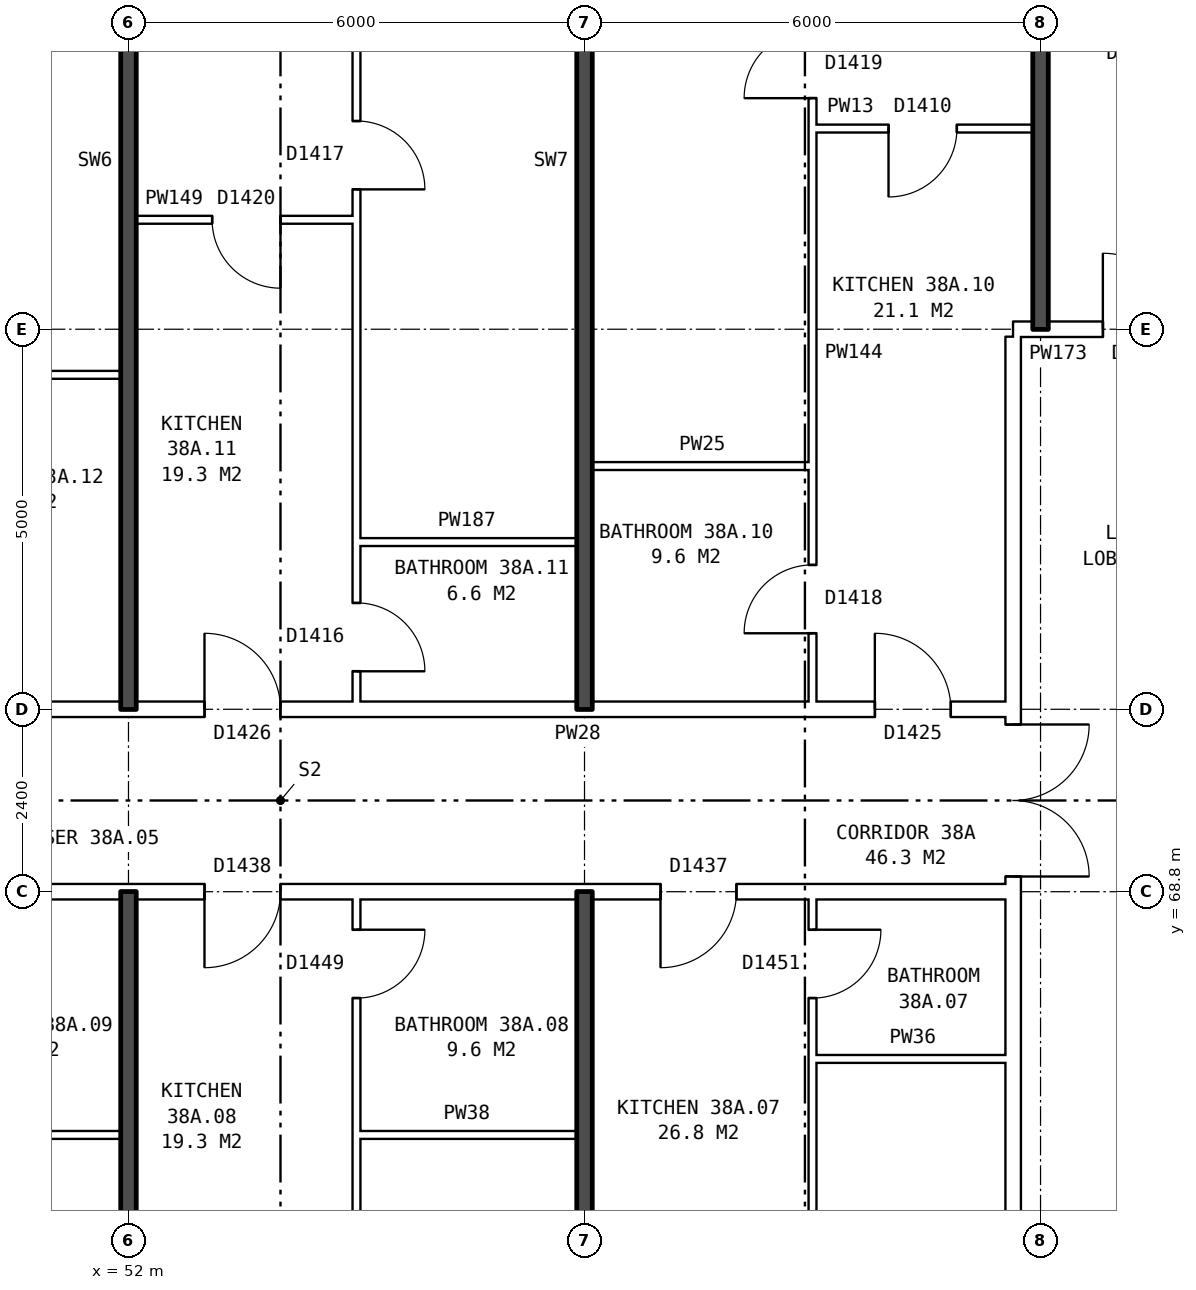
"""IFC4 building model, lengths in metres.
Left out: names, types, materials, properties, quantities, classifications, styles, units other than length and angle.
Written with IfcOpenShell. Run it as: python <this file> out.ifc"""

import sys

from ifc_helpers import new_model, si_unit, direction, frame, frame_2d, origin, place, context, subcontext, project, spatial, rectangle, extrude, element, fill, save


model = new_model("IFC4")
c1 = context("Model", 3, precision=1e-05, world=origin(), true_north=direction((0.0, 1.0)))
c2 = subcontext(c1, "Body", "Model", "MODEL_VIEW")
j1 = project(units=[si_unit("LENGTHUNIT", "METRE"), si_unit("PLANEANGLEUNIT", "RADIAN")], contexts=[c1])
p1 = place(None, origin())
s1 = spatial("IfcSite", under=j1, at=p1, CompositionType="ELEMENT")
p2 = place(p1, origin())
s2 = spatial("IfcBuilding", under=s1, at=p2, CompositionType="ELEMENT")
p3 = place(p2, frame((0.0, 0.0, 136.1)))
s3 = spatial("IfcBuildingStorey", under=s2, at=p3, CompositionType="ELEMENT", Elevation=136.1)
p4 = place(p3, frame((63.64, 63.9, 0.0), z_axis=(0.0, 0.0, 1.0), x_axis=(0.0, 1.0, 0.0)))
e1 = element("IfcWall", 1, at=p4, inside=s3, PredefinedType="PARTITIONING", context=c2, shape_type="SweptSolid", body=[
    extrude(rectangle(XDim=12.2, YDim=0.2, at=frame_2d((6.1, 0.0))), origin(), (0.0, 0.0, 1.0), 2.85),
])
p5 = place(p4, frame((5.1, 0.0, 0.0)))
e2 = element("IfcOpeningElement", 2, at=p5, cuts=e1, PredefinedType="OPENING", context=c2, shape_type="SweptSolid", body=[
    extrude(rectangle(XDim=2.0, YDim=2.1, at=frame_2d((1.0, 1.05))), frame((0.0, 0.11, 0.0), z_axis=(0.0, -1.0, 0.0), x_axis=(1.0, 0.0, 0.0)), (0.0, 0.0, 1.0), 0.22),
])
for number, where, z_axis, x_axis in (
    (3, (49.0, 65.6, 0.0), (0.0, 0.0, 1.0), (1.0, 0.0, 0.0)),
    (4, (55.0, 65.6, 0.0), (0.0, 0.0, 1.0), (1.0, 0.0, 0.0)),
):
    element("IfcWall", number, at=place(p3, frame(where, z_axis=z_axis, x_axis=x_axis)), inside=s3, PredefinedType="PARTITIONING", context=c2, shape_type="SweptSolid", body=[
        extrude(rectangle(XDim=2.9, YDim=0.1, at=frame_2d((1.45, 0.0))), origin(), (0.0, 0.0, 1.0), 2.85),
    ])
p6 = place(p3, frame((61.0, 66.6, 0.0), z_axis=(0.0, 0.0, 1.0), x_axis=(1.0, 0.0, 0.0)))
e5 = element("IfcWall", 5, at=p6, inside=s3, PredefinedType="PARTITIONING", context=c2, shape_type="SweptSolid", body=[
    extrude(rectangle(XDim=2.64, YDim=0.1, at=frame_2d((1.32, 0.0))), origin(), (0.0, 0.0, 1.0), 2.85),
])
p7 = place(p3, frame((44.36, 68.8, 0.0), z_axis=(0.0, 0.0, 1.0), x_axis=(1.0, 0.0, 0.0)))
e6 = element("IfcWall", 6, at=p7, inside=s3, PredefinedType="PARTITIONING", context=c2, shape_type="SweptSolid", body=[
    extrude(rectangle(XDim=19.28, YDim=0.2, at=frame_2d((9.64, 0.0))), origin(), (0.0, 0.0, 1.0), 2.85),
])
p8 = place(p7, frame((14.64, 0.0, 0.0)))
e7 = element("IfcOpeningElement", 7, at=p8, cuts=e6, PredefinedType="OPENING", context=c2, shape_type="SweptSolid", body=[
    extrude(rectangle(XDim=1.0, YDim=2.1, at=frame_2d((0.5, 1.05))), frame((0.0, 0.11, 0.0), z_axis=(0.0, -1.0, 0.0), x_axis=(1.0, 0.0, 0.0)), (0.0, 0.0, 1.0), 0.22),
])
p9 = place(p7, frame((8.64, 0.0, 0.0)))
e8 = element("IfcOpeningElement", 8, at=p9, cuts=e6, PredefinedType="OPENING", context=c2, shape_type="SweptSolid", body=[
    extrude(rectangle(XDim=1.0, YDim=2.1, at=frame_2d((0.5, 1.05))), frame((0.0, 0.11, 0.0), z_axis=(0.0, -1.0, 0.0), x_axis=(1.0, 0.0, 0.0)), (0.0, 0.0, 1.0), 0.22),
])
p10 = place(p7, frame((2.64, 0.0, 0.0)))
e9 = element("IfcOpeningElement", 9, at=p10, cuts=e6, PredefinedType="OPENING", context=c2, shape_type="SweptSolid", body=[
    extrude(rectangle(XDim=1.0, YDim=2.1, at=frame_2d((0.5, 1.05))), frame((0.0, 0.11, 0.0), z_axis=(0.0, -1.0, 0.0), x_axis=(1.0, 0.0, 0.0)), (0.0, 0.0, 1.0), 0.22),
])
p11 = place(p3, frame((44.36, 71.2, 0.0), z_axis=(0.0, 0.0, 1.0), x_axis=(1.0, 0.0, 0.0)))
e10 = element("IfcWall", 10, at=p11, inside=s3, PredefinedType="PARTITIONING", context=c2, shape_type="SweptSolid", body=[
    extrude(rectangle(XDim=19.28, YDim=0.2, at=frame_2d((9.64, 0.0))), origin(), (0.0, 0.0, 1.0), 2.85),
])
p12 = place(p11, frame((17.46, 0.0, 0.0)))
e11 = element("IfcOpeningElement", 11, at=p12, cuts=e10, PredefinedType="OPENING", context=c2, shape_type="SweptSolid", body=[
    extrude(rectangle(XDim=1.0, YDim=2.1, at=frame_2d((0.5, 1.05))), frame((0.0, 0.11, 0.0), z_axis=(0.0, -1.0, 0.0), x_axis=(1.0, 0.0, 0.0)), (0.0, 0.0, 1.0), 0.22),
])
p13 = place(p11, frame((8.64, 0.0, 0.0)))
e12 = element("IfcOpeningElement", 12, at=p13, cuts=e10, PredefinedType="OPENING", context=c2, shape_type="SweptSolid", body=[
    extrude(rectangle(XDim=1.0, YDim=2.1, at=frame_2d((0.5, 1.05))), frame((0.0, 0.11, 0.0), z_axis=(0.0, -1.0, 0.0), x_axis=(1.0, 0.0, 0.0)), (0.0, 0.0, 1.0), 0.22),
])
p14 = place(p11, frame((2.64, 0.0, 0.0)))
e13 = element("IfcOpeningElement", 13, at=p14, cuts=e10, PredefinedType="OPENING", context=c2, shape_type="SweptSolid", body=[
    extrude(rectangle(XDim=1.0, YDim=2.1, at=frame_2d((0.5, 1.05))), frame((0.0, 0.11, 0.0), z_axis=(0.0, -1.0, 0.0), x_axis=(1.0, 0.0, 0.0)), (0.0, 0.0, 1.0), 0.22),
])
for number, where, z_axis, x_axis in (
    (14, (55.0, 73.4, 0.0), (0.0, 0.0, 1.0), (1.0, 0.0, 0.0)),
    (15, (58.1, 74.4, 0.0), (0.0, 0.0, 1.0), (1.0, 0.0, 0.0)),
    (16, (49.0, 75.6, 0.0), (0.0, 0.0, 1.0), (1.0, 0.0, 0.0)),
):
    element("IfcWall", number, at=place(p3, frame(where, z_axis=z_axis, x_axis=x_axis)), inside=s3, PredefinedType="PARTITIONING", context=c2, shape_type="SweptSolid", body=[
        extrude(rectangle(XDim=2.9, YDim=0.1, at=frame_2d((1.45, 0.0))), origin(), (0.0, 0.0, 1.0), 2.85),
    ])
p15 = place(p3, frame((63.64, 76.2, 0.0), z_axis=(0.0, 0.0, 1.0), x_axis=(1.0, 0.0, 0.0)))
e17 = element("IfcWall", 17, at=p15, inside=s3, PredefinedType="PARTITIONING", context=c2, shape_type="SweptSolid", body=[
    extrude(rectangle(XDim=3.0, YDim=0.2, at=frame_2d((1.5, 0.0))), origin(), (0.0, 0.0, 1.0), 2.85),
])
p16 = place(p15, frame((1.18, 0.0, 0.0)))
e18 = element("IfcOpeningElement", 18, at=p16, cuts=e17, PredefinedType="OPENING", context=c2, shape_type="SweptSolid", body=[
    extrude(rectangle(XDim=1.0, YDim=2.1, at=frame_2d((0.5, 1.05))), frame((0.0, 0.11, 0.0), z_axis=(0.0, -1.0, 0.0), x_axis=(1.0, 0.0, 0.0)), (0.0, 0.0, 1.0), 0.22),
])
p17 = place(p3, frame((52.1, 77.64, 0.0), z_axis=(0.0, 0.0, 1.0), x_axis=(1.0, 0.0, 0.0)))
e19 = element("IfcWall", 19, at=p17, inside=s3, PredefinedType="PARTITIONING", context=c2, shape_type="SweptSolid", body=[
    extrude(rectangle(XDim=2.9, YDim=0.1, at=frame_2d((1.45, 0.0))), origin(), (0.0, 0.0, 1.0), 2.85),
])
p18 = place(p17, frame((1.0, 0.0, 0.0)))
e20 = element("IfcOpeningElement", 20, at=p18, cuts=e19, PredefinedType="OPENING", context=c2, shape_type="SweptSolid", body=[
    extrude(rectangle(XDim=0.9, YDim=2.1, at=frame_2d((0.45, 1.05))), frame((0.0, 0.06, 0.0), z_axis=(0.0, -1.0, 0.0), x_axis=(1.0, 0.0, 0.0)), (0.0, 0.0, 1.0), 0.12),
])
p19 = place(p3, frame((61.0, 78.84, 0.0), z_axis=(0.0, 0.0, 1.0), x_axis=(1.0, 0.0, 0.0)))
e21 = element("IfcWall", 21, at=p19, inside=s3, PredefinedType="PARTITIONING", context=c2, shape_type="SweptSolid", body=[
    extrude(rectangle(XDim=2.9, YDim=0.1, at=frame_2d((1.45, 0.0))), origin(), (0.0, 0.0, 1.0), 2.85),
])
p20 = place(p19, frame((1.0, 0.0, 0.0)))
e22 = element("IfcOpeningElement", 22, at=p20, cuts=e21, PredefinedType="OPENING", context=c2, shape_type="SweptSolid", body=[
    extrude(rectangle(XDim=0.9, YDim=2.1, at=frame_2d((0.45, 1.05))), frame((0.0, 0.06, 0.0), z_axis=(0.0, -1.0, 0.0), x_axis=(1.0, 0.0, 0.0)), (0.0, 0.0, 1.0), 0.12),
])
for number, where, z_axis, x_axis in (
    (23, (52.0, 54.36, 0.0), (0.0, 0.0, 1.0), (0.0, 1.0, 0.0)),
    (24, (52.0, 71.2, 0.0), (0.0, 0.0, 1.0), (0.0, 1.0, 0.0)),
):
    element("IfcWall", number, at=place(p3, frame(where, z_axis=z_axis, x_axis=x_axis)), inside=s3, PredefinedType="SOLIDWALL", context=c2, shape_type="SweptSolid", body=[
        extrude(rectangle(XDim=14.44, YDim=0.2, at=frame_2d((7.22, 0.0))), origin(), (0.0, 0.0, 1.0), 2.85),
    ])
p21 = place(p3, frame((55.0, 54.36, 0.0), z_axis=(0.0, 0.0, 1.0), x_axis=(0.0, 1.0, 0.0)))
e25 = element("IfcWall", 25, at=p21, inside=s3, PredefinedType="PARTITIONING", context=c2, shape_type="SweptSolid", body=[
    extrude(rectangle(XDim=14.34, YDim=0.1, at=frame_2d((7.17, 0.0))), origin(), (0.0, 0.0, 1.0), 2.85),
])
p22 = place(p21, frame((6.7, 0.0, 0.0)))
e26 = element("IfcOpeningElement", 26, at=p22, cuts=e25, PredefinedType="OPENING", context=c2, shape_type="SweptSolid", body=[
    extrude(rectangle(XDim=0.9, YDim=2.1, at=frame_2d((0.45, 1.05))), frame((0.0, 0.06, 0.0), z_axis=(0.0, -1.0, 0.0), x_axis=(1.0, 0.0, 0.0)), (0.0, 0.0, 1.0), 0.12),
])
p23 = place(p21, frame((13.04, 0.0, 0.0)))
e27 = element("IfcOpeningElement", 27, at=p23, cuts=e25, PredefinedType="OPENING", context=c2, shape_type="SweptSolid", body=[
    extrude(rectangle(XDim=0.9, YDim=2.1, at=frame_2d((0.45, 1.05))), frame((0.0, 0.06, 0.0), z_axis=(0.0, -1.0, 0.0), x_axis=(1.0, 0.0, 0.0)), (0.0, 0.0, 1.0), 0.12),
])
p24 = place(p3, frame((55.0, 71.3, 0.0), z_axis=(0.0, 0.0, 1.0), x_axis=(0.0, 1.0, 0.0)))
e28 = element("IfcWall", 28, at=p24, inside=s3, PredefinedType="PARTITIONING", context=c2, shape_type="SweptSolid", body=[
    extrude(rectangle(XDim=14.34, YDim=0.1, at=frame_2d((7.17, 0.0))), origin(), (0.0, 0.0, 1.0), 2.85),
])
p25 = place(p24, frame((6.74, 0.0, 0.0)))
e29 = element("IfcOpeningElement", 29, at=p25, cuts=e28, PredefinedType="OPENING", context=c2, shape_type="SweptSolid", body=[
    extrude(rectangle(XDim=0.9, YDim=2.1, at=frame_2d((0.45, 1.05))), frame((0.0, 0.06, 0.0), z_axis=(0.0, -1.0, 0.0), x_axis=(1.0, 0.0, 0.0)), (0.0, 0.0, 1.0), 0.12),
])
p26 = place(p24, frame((0.4, 0.0, 0.0)))
e30 = element("IfcOpeningElement", 30, at=p26, cuts=e28, PredefinedType="OPENING", context=c2, shape_type="SweptSolid", body=[
    extrude(rectangle(XDim=0.9, YDim=2.1, at=frame_2d((0.45, 1.05))), frame((0.0, 0.06, 0.0), z_axis=(0.0, -1.0, 0.0), x_axis=(1.0, 0.0, 0.0)), (0.0, 0.0, 1.0), 0.12),
])
for number, where, z_axis, x_axis in (
    (31, (58.0, 54.36, 0.0), (0.0, 0.0, 1.0), (0.0, 1.0, 0.0)),
    (32, (58.0, 71.2, 0.0), (0.0, 0.0, 1.0), (0.0, 1.0, 0.0)),
):
    element("IfcWall", number, at=place(p3, frame(where, z_axis=z_axis, x_axis=x_axis)), inside=s3, PredefinedType="SOLIDWALL", context=c2, shape_type="SweptSolid", body=[
        extrude(rectangle(XDim=14.44, YDim=0.2, at=frame_2d((7.22, 0.0))), origin(), (0.0, 0.0, 1.0), 2.85),
    ])
p27 = place(p3, frame((61.0, 54.36, 0.0), z_axis=(0.0, 0.0, 1.0), x_axis=(0.0, 1.0, 0.0)))
e33 = element("IfcWall", 33, at=p27, inside=s3, PredefinedType="PARTITIONING", context=c2, shape_type="SweptSolid", body=[
    extrude(rectangle(XDim=14.34, YDim=0.1, at=frame_2d((7.17, 0.0))), origin(), (0.0, 0.0, 1.0), 2.85),
])
p28 = place(p27, frame((4.2, 0.0, 0.0)))
e34 = element("IfcOpeningElement", 34, at=p28, cuts=e33, PredefinedType="OPENING", context=c2, shape_type="SweptSolid", body=[
    extrude(rectangle(XDim=0.9, YDim=2.1, at=frame_2d((0.45, 1.05))), frame((0.0, 0.06, 0.0), z_axis=(0.0, -1.0, 0.0), x_axis=(1.0, 0.0, 0.0)), (0.0, 0.0, 1.0), 0.12),
])
p29 = place(p27, frame((13.04, 0.0, 0.0)))
e35 = element("IfcOpeningElement", 35, at=p29, cuts=e33, PredefinedType="OPENING", context=c2, shape_type="SweptSolid", body=[
    extrude(rectangle(XDim=0.9, YDim=2.1, at=frame_2d((0.45, 1.05))), frame((0.0, 0.06, 0.0), z_axis=(0.0, -1.0, 0.0), x_axis=(1.0, 0.0, 0.0)), (0.0, 0.0, 1.0), 0.12),
])
p30 = place(p3, frame((61.0, 71.3, 0.0), z_axis=(0.0, 0.0, 1.0), x_axis=(0.0, 1.0, 0.0)))
e36 = element("IfcWall", 36, at=p30, inside=s3, PredefinedType="PARTITIONING", context=c2, shape_type="SweptSolid", body=[
    extrude(rectangle(XDim=14.34, YDim=0.1, at=frame_2d((7.17, 0.0))), origin(), (0.0, 0.0, 1.0), 2.85),
])
p31 = place(p30, frame((7.94, 0.0, 0.0)))
e37 = element("IfcOpeningElement", 37, at=p31, cuts=e36, PredefinedType="OPENING", context=c2, shape_type="SweptSolid", body=[
    extrude(rectangle(XDim=0.9, YDim=2.1, at=frame_2d((0.45, 1.05))), frame((0.0, 0.06, 0.0), z_axis=(0.0, -1.0, 0.0), x_axis=(1.0, 0.0, 0.0)), (0.0, 0.0, 1.0), 0.12),
])
p32 = place(p30, frame((0.9, 0.0, 0.0)))
e38 = element("IfcOpeningElement", 38, at=p32, cuts=e36, PredefinedType="OPENING", context=c2, shape_type="SweptSolid", body=[
    extrude(rectangle(XDim=0.9, YDim=2.1, at=frame_2d((0.45, 1.05))), frame((0.0, 0.06, 0.0), z_axis=(0.0, -1.0, 0.0), x_axis=(1.0, 0.0, 0.0)), (0.0, 0.0, 1.0), 0.12),
])
p33 = place(p3, frame((64.0, 76.2, 0.0), z_axis=(0.0, 0.0, 1.0), x_axis=(0.0, 1.0, 0.0)))
e39 = element("IfcWall", 39, at=p33, inside=s3, PredefinedType="SOLIDWALL", context=c2, shape_type="SweptSolid", body=[
    extrude(rectangle(XDim=9.44, YDim=0.2, at=frame_2d((4.72, 0.0))), origin(), (0.0, 0.0, 1.0), 2.85),
])
p34 = place(p5, frame((2.0, 0.0, 0.0), z_axis=(0.0, 0.0, 1.0), x_axis=(-1.0, 0.0, 0.0)))
e40 = element("IfcDoor", 40, at=p34, inside=s3, OperationType="DOUBLE_DOOR_SINGLE_SWING", PredefinedType="DOOR", context=c2, shape_type="SweptSolid", body=[
    extrude(rectangle(XDim=2.0, YDim=2.1, at=frame_2d((1.0, 1.05))), frame((0.0, 0.025, 0.0), z_axis=(0.0, -1.0, 0.0), x_axis=(1.0, 0.0, 0.0)), (0.0, 0.0, 1.0), 0.05),
])
fill(e2, e40)
p35 = place(p16, origin())
e41 = element("IfcDoor", 41, at=p35, inside=s3, OperationType="SINGLE_SWING_LEFT", PredefinedType="DOOR", context=c2, shape_type="SweptSolid", body=[
    extrude(rectangle(XDim=1.0, YDim=2.1, at=frame_2d((0.5, 1.05))), frame((0.0, 0.025, 0.0), z_axis=(0.0, -1.0, 0.0), x_axis=(1.0, 0.0, 0.0)), (0.0, 0.0, 1.0), 0.05),
])
fill(e18, e41)
p36 = place(p8, frame((1.0, 0.0, 0.0), z_axis=(0.0, 0.0, 1.0), x_axis=(-1.0, 0.0, 0.0)))
e42 = element("IfcDoor", 42, at=p36, inside=s3, OperationType="SINGLE_SWING_RIGHT", PredefinedType="DOOR", context=c2, shape_type="SweptSolid", body=[
    extrude(rectangle(XDim=1.0, YDim=2.1, at=frame_2d((0.5, 1.05))), frame((0.0, 0.025, 0.0), z_axis=(0.0, -1.0, 0.0), x_axis=(1.0, 0.0, 0.0)), (0.0, 0.0, 1.0), 0.05),
])
fill(e7, e42)
p37 = place(p29, frame((0.9, 0.0, 0.0), z_axis=(0.0, 0.0, 1.0), x_axis=(-1.0, 0.0, 0.0)))
e43 = element("IfcDoor", 43, at=p37, inside=s3, OperationType="SINGLE_SWING_LEFT", PredefinedType="DOOR", context=c2, shape_type="SweptSolid", body=[
    extrude(rectangle(XDim=0.9, YDim=2.1, at=frame_2d((0.45, 1.05))), frame((0.0, 0.025, 0.0), z_axis=(0.0, -1.0, 0.0), x_axis=(1.0, 0.0, 0.0)), (0.0, 0.0, 1.0), 0.05),
])
fill(e35, e43)
p38 = place(p9, frame((1.0, 0.0, 0.0), z_axis=(0.0, 0.0, 1.0), x_axis=(-1.0, 0.0, 0.0)))
e44 = element("IfcDoor", 44, at=p38, inside=s3, OperationType="SINGLE_SWING_RIGHT", PredefinedType="DOOR", context=c2, shape_type="SweptSolid", body=[
    extrude(rectangle(XDim=1.0, YDim=2.1, at=frame_2d((0.5, 1.05))), frame((0.0, 0.025, 0.0), z_axis=(0.0, -1.0, 0.0), x_axis=(1.0, 0.0, 0.0)), (0.0, 0.0, 1.0), 0.05),
])
fill(e8, e44)
p39 = place(p23, frame((0.9, 0.0, 0.0), z_axis=(0.0, 0.0, 1.0), x_axis=(-1.0, 0.0, 0.0)))
e45 = element("IfcDoor", 45, at=p39, inside=s3, OperationType="SINGLE_SWING_LEFT", PredefinedType="DOOR", context=c2, shape_type="SweptSolid", body=[
    extrude(rectangle(XDim=0.9, YDim=2.1, at=frame_2d((0.45, 1.05))), frame((0.0, 0.025, 0.0), z_axis=(0.0, -1.0, 0.0), x_axis=(1.0, 0.0, 0.0)), (0.0, 0.0, 1.0), 0.05),
])
fill(e27, e45)
p40 = place(p31, origin())
e46 = element("IfcDoor", 46, at=p40, inside=s3, OperationType="SINGLE_SWING_LEFT", PredefinedType="DOOR", context=c2, shape_type="SweptSolid", body=[
    extrude(rectangle(XDim=0.9, YDim=2.1, at=frame_2d((0.45, 1.05))), frame((0.0, 0.025, 0.0), z_axis=(0.0, -1.0, 0.0), x_axis=(1.0, 0.0, 0.0)), (0.0, 0.0, 1.0), 0.05),
])
fill(e37, e46)
p41 = place(p12, origin())
e47 = element("IfcDoor", 47, at=p41, inside=s3, OperationType="SINGLE_SWING_LEFT", PredefinedType="DOOR", context=c2, shape_type="SweptSolid", body=[
    extrude(rectangle(XDim=1.0, YDim=2.1, at=frame_2d((0.5, 1.05))), frame((0.0, 0.025, 0.0), z_axis=(0.0, -1.0, 0.0), x_axis=(1.0, 0.0, 0.0)), (0.0, 0.0, 1.0), 0.05),
])
fill(e11, e47)
p42 = place(p20, frame((0.9, 0.0, 0.0), z_axis=(0.0, 0.0, 1.0), x_axis=(-1.0, 0.0, 0.0)))
e48 = element("IfcDoor", 48, at=p42, inside=s3, OperationType="SINGLE_SWING_RIGHT", PredefinedType="DOOR", context=c2, shape_type="SweptSolid", body=[
    extrude(rectangle(XDim=0.9, YDim=2.1, at=frame_2d((0.45, 1.05))), frame((0.0, 0.025, 0.0), z_axis=(0.0, -1.0, 0.0), x_axis=(1.0, 0.0, 0.0)), (0.0, 0.0, 1.0), 0.05),
])
fill(e22, e48)
p43 = place(p32, origin())
e49 = element("IfcDoor", 49, at=p43, inside=s3, OperationType="SINGLE_SWING_LEFT", PredefinedType="DOOR", context=c2, shape_type="SweptSolid", body=[
    extrude(rectangle(XDim=0.9, YDim=2.1, at=frame_2d((0.45, 1.05))), frame((0.0, 0.025, 0.0), z_axis=(0.0, -1.0, 0.0), x_axis=(1.0, 0.0, 0.0)), (0.0, 0.0, 1.0), 0.05),
])
fill(e38, e49)
p44 = place(p25, frame((0.9, 0.0, 0.0), z_axis=(0.0, 0.0, 1.0), x_axis=(-1.0, 0.0, 0.0)))
e50 = element("IfcDoor", 50, at=p44, inside=s3, OperationType="SINGLE_SWING_RIGHT", PredefinedType="DOOR", context=c2, shape_type="SweptSolid", body=[
    extrude(rectangle(XDim=0.9, YDim=2.1, at=frame_2d((0.45, 1.05))), frame((0.0, 0.025, 0.0), z_axis=(0.0, -1.0, 0.0), x_axis=(1.0, 0.0, 0.0)), (0.0, 0.0, 1.0), 0.05),
])
fill(e29, e50)
p45 = place(p13, origin())
e51 = element("IfcDoor", 51, at=p45, inside=s3, OperationType="SINGLE_SWING_LEFT", PredefinedType="DOOR", context=c2, shape_type="SweptSolid", body=[
    extrude(rectangle(XDim=1.0, YDim=2.1, at=frame_2d((0.5, 1.05))), frame((0.0, 0.025, 0.0), z_axis=(0.0, -1.0, 0.0), x_axis=(1.0, 0.0, 0.0)), (0.0, 0.0, 1.0), 0.05),
])
fill(e12, e51)
p46 = place(p18, frame((0.9, 0.0, 0.0), z_axis=(0.0, 0.0, 1.0), x_axis=(-1.0, 0.0, 0.0)))
e52 = element("IfcDoor", 52, at=p46, inside=s3, OperationType="SINGLE_SWING_LEFT", PredefinedType="DOOR", context=c2, shape_type="SweptSolid", body=[
    extrude(rectangle(XDim=0.9, YDim=2.1, at=frame_2d((0.45, 1.05))), frame((0.0, 0.025, 0.0), z_axis=(0.0, -1.0, 0.0), x_axis=(1.0, 0.0, 0.0)), (0.0, 0.0, 1.0), 0.05),
])
fill(e20, e52)
p47 = place(p26, frame((0.9, 0.0, 0.0), z_axis=(0.0, 0.0, 1.0), x_axis=(-1.0, 0.0, 0.0)))
e53 = element("IfcDoor", 53, at=p47, inside=s3, OperationType="SINGLE_SWING_RIGHT", PredefinedType="DOOR", context=c2, shape_type="SweptSolid", body=[
    extrude(rectangle(XDim=0.9, YDim=2.1, at=frame_2d((0.45, 1.05))), frame((0.0, 0.025, 0.0), z_axis=(0.0, -1.0, 0.0), x_axis=(1.0, 0.0, 0.0)), (0.0, 0.0, 1.0), 0.05),
])
fill(e30, e53)
save(model, sys.argv[1])
